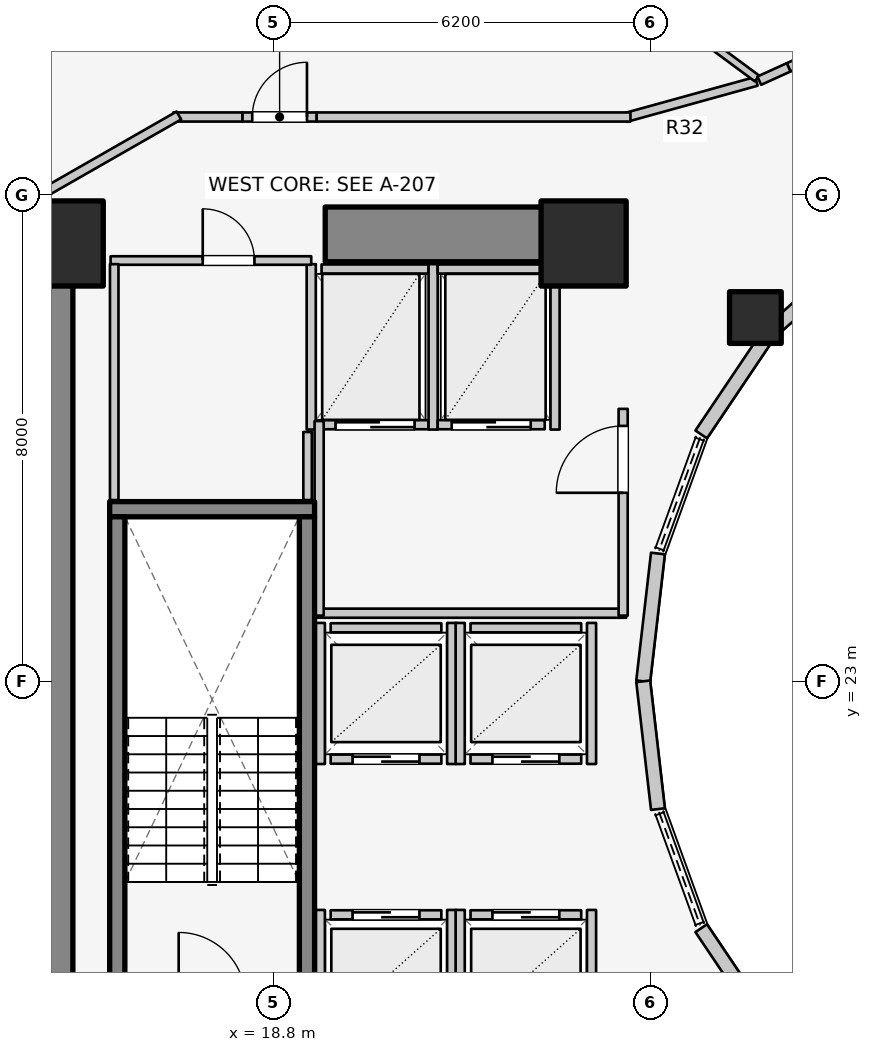
"""IFC4 building model, lengths in metres.
Left out: names, types, materials, properties, quantities, classifications, styles, units other than length and angle.
Written with IfcOpenShell. Run it as: python <this file> out.ifc"""

import sys

from ifc_helpers import new_model, si_unit, direction, frame, frame_2d, origin, origin_2d, place, context, subcontext, project, spatial, rectangle, extrude, element, fill, save


model = new_model("IFC4")
c1 = context("Model", 3, precision=1e-05, world=origin(), true_north=direction((0.0, 1.0)))
c2 = subcontext(c1, "Body", "Model", "MODEL_VIEW")
j1 = project(units=[si_unit("LENGTHUNIT", "METRE"), si_unit("PLANEANGLEUNIT", "RADIAN")], contexts=[c1])
p1 = place(None, origin())
s1 = spatial("IfcSite", under=j1, at=p1, CompositionType="ELEMENT")
p2 = place(p1, origin())
s2 = spatial("IfcBuilding", under=s1, at=p2, CompositionType="ELEMENT")
p3 = place(p2, frame((0.0, 0.0, 73.2)))
s3 = spatial("IfcBuildingStorey", under=s2, at=p3, CompositionType="ELEMENT", Elevation=73.2)
p4 = place(p3, frame((15.05, 17.05, 0.0), z_axis=(0.0, 0.0, 1.0), x_axis=(0.0, 1.0, 0.0)))
e1 = element("IfcWall", 1, at=p4, inside=s3, PredefinedType="SHEAR", context=c2, shape_type="SweptSolid", body=[
    extrude(rectangle(XDim=12.8, YDim=0.9, at=frame_2d((6.4, 0.0))), origin(), (0.0, 0.0, 1.0), 3.1),
])
p5 = place(p3, frame((19.65, 30.35, 0.0), z_axis=(0.0, 0.0, 1.0), x_axis=(1.0, 0.0, 0.0)))
e2 = element("IfcWall", 2, at=p5, inside=s3, PredefinedType="SHEAR", context=c2, shape_type="SweptSolid", body=[
    extrude(rectangle(XDim=4.5, YDim=0.9, at=frame_2d((2.25, 0.0))), origin(), (0.0, 0.0, 1.0), 3.1),
])
p6 = place(p3, frame((16.105, 25.83, 0.0), z_axis=(0.0, 0.0, 1.0), x_axis=(1.0, 0.0, 0.0)))
e3 = element("IfcWall", 3, at=p6, inside=s3, PredefinedType="SOLIDWALL", context=c2, shape_type="SweptSolid", body=[
    extrude(rectangle(XDim=3.37, YDim=0.25, at=frame_2d((1.685, 0.0))), origin(), (0.0, 0.0, 1.0), 3.1),
])
for number, where, z_axis, x_axis in (
    (4, (16.23, 17.895, 0.0), (0.0, 0.0, 1.0), (0.0, 1.0, 0.0)),
    (5, (19.35, 17.895, 0.0), (0.0, 0.0, 1.0), (0.0, 1.0, 0.0)),
):
    element("IfcWall", number, at=place(p3, frame(where, z_axis=z_axis, x_axis=x_axis)), inside=s3, PredefinedType="SOLIDWALL", context=c2, shape_type="SweptSolid", body=[
        extrude(rectangle(XDim=7.81, YDim=0.25, at=frame_2d((3.905, 0.0))), origin(), (0.0, 0.0, 1.0), 3.1),
    ])
for number, where, z_axis, x_axis in (
    (6, (23.9, 30.2, 0.0), (0.0, 0.0, 1.0), (1.0, 0.0, 0.0)),
    (7, (15.3, 30.2, 0.0), (0.0, 0.0, 1.0), (1.0, 0.0, 0.0)),
):
    element("IfcColumn", number, at=place(p3, frame(where, z_axis=z_axis, x_axis=x_axis)), inside=s3, PredefinedType="COLUMN", context=c2, shape_type="SweptSolid", body=[
        extrude(rectangle(XDim=1.4, YDim=1.4, at=origin_2d()), origin(), (0.0, 0.0, 1.0), 3.1),
    ])
p7 = place(p3, frame((26.725, 28.982, 0.0), z_axis=(0.0, 0.0, 1.0), x_axis=(1.0, 0.0, 0.0)))
e8 = element("IfcColumn", 8, at=p7, inside=s3, PredefinedType="COLUMN", context=c2, shape_type="SweptSolid", body=[
    extrude(rectangle(XDim=0.85, YDim=0.85, at=origin_2d()), origin(), (0.0, 0.0, 1.0), 3.1),
])
p8 = place(p3, frame((28.44, 30.032, 0.0), z_axis=(0.0, 0.0, 1.0), x_axis=(-0.752576694707, -0.658504607869, 0.0)))
e9 = element("IfcWall", 9, at=p8, inside=s3, PredefinedType="STANDARD", context=c2, shape_type="SweptSolid", body=[
    extrude(rectangle(XDim=1.959, YDim=0.23, at=frame_2d((0.98, 0.0))), origin(), (0.0, 0.0, 1.0), 1.22),
])
p9 = place(p3, frame((26.965, 28.742, 0.0), z_axis=(0.0, 0.0, 1.0), x_axis=(-0.558197800898, -0.829707909492, 0.0)))
e10 = element("IfcWall", 10, at=p9, inside=s3, PredefinedType="STANDARD", context=c2, shape_type="SweptSolid", body=[
    extrude(rectangle(XDim=2.027, YDim=0.23, at=frame_2d((1.013, 0.0))), origin(), (0.0, 0.0, 1.0), 1.22),
])
for number, where, z_axis, x_axis in (
    (11, (25.123, 25.102, 0.0), (0.0, 0.0, 1.0), (-0.115, -0.993, 0.0)),
    (12, (24.88, 23.0, 0.0), (0.0, 0.0, 1.0), (0.115, -0.993, 0.0)),
):
    element("IfcWall", number, at=place(p3, frame(where, z_axis=z_axis, x_axis=x_axis)), inside=s3, PredefinedType="STANDARD", context=c2, shape_type="SweptSolid", body=[
        extrude(rectangle(XDim=2.115, YDim=0.23, at=frame_2d((1.058, 0.0))), origin(), (0.0, 0.0, 1.0), 2.56),
    ])
p10 = place(p3, frame((25.834, 18.94, 0.0), z_axis=(0.0, 0.0, 1.0), x_axis=(0.558197800898, -0.829707909492, 0.0)))
e13 = element("IfcWall", 13, at=p10, inside=s3, PredefinedType="STANDARD", context=c2, shape_type="SweptSolid", body=[
    extrude(rectangle(XDim=2.027, YDim=0.23, at=frame_2d((1.013, 0.0))), origin(), (0.0, 0.0, 1.0), 1.22),
])
p11 = place(p3, frame((19.74, 19.16, 0.0), z_axis=(0.0, 0.0, 1.0), x_axis=(1.0, 0.0, 0.0)))
e14 = element("IfcWall", 14, at=p11, inside=s3, PredefinedType="SOLIDWALL", context=c2, shape_type="SweptSolid", body=[
    extrude(rectangle(XDim=1.82, YDim=0.15, at=frame_2d((0.91, 0.0))), origin(), (0.0, 0.0, 1.0), 2.575),
])
p12 = place(p11, frame((0.36, 0.0, 0.0)))
e15 = element("IfcOpeningElement", 15, at=p12, cuts=e14, PredefinedType="OPENING", context=c2, shape_type="SweptSolid", body=[
    extrude(rectangle(XDim=1.1, YDim=2.1, at=frame_2d((0.55, 1.05))), frame((0.0, 0.085, 0.0), z_axis=(0.0, -1.0, 0.0), x_axis=(1.0, 0.0, 0.0)), (0.0, 0.0, 1.0), 0.17),
])
p13 = place(p3, frame((19.57, 17.02, 0.0), z_axis=(0.0, 0.0, 1.0), x_axis=(0.0, 1.0, 0.0)))
e16 = element("IfcWall", 16, at=p13, inside=s3, PredefinedType="SOLIDWALL", context=c2, shape_type="SweptSolid", body=[
    extrude(rectangle(XDim=2.22, YDim=0.15, at=frame_2d((1.11, 0.0))), origin(), (0.0, 0.0, 1.0), 2.12),
])
p14 = place(p3, frame((21.73, 17.02, 0.0), z_axis=(0.0, 0.0, 1.0), x_axis=(0.0, 1.0, 0.0)))
e17 = element("IfcWall", 17, at=p14, inside=s3, PredefinedType="SOLIDWALL", context=c2, shape_type="SweptSolid", body=[
    extrude(rectangle(XDim=2.22, YDim=0.15, at=frame_2d((1.11, 0.0))), origin(), (0.0, 0.0, 1.0), 2.575),
])
p15 = place(p3, frame((22.04, 19.16, 0.0), z_axis=(0.0, 0.0, 1.0), x_axis=(1.0, 0.0, 0.0)))
e18 = element("IfcWall", 18, at=p15, inside=s3, PredefinedType="SOLIDWALL", context=c2, shape_type="SweptSolid", body=[
    extrude(rectangle(XDim=1.82, YDim=0.15, at=frame_2d((0.91, 0.0))), origin(), (0.0, 0.0, 1.0), 2.12),
])
p16 = place(p15, frame((0.36, 0.0, 0.0)))
e19 = element("IfcOpeningElement", 19, at=p16, cuts=e18, PredefinedType="OPENING", context=c2, shape_type="SweptSolid", body=[
    extrude(rectangle(XDim=1.1, YDim=2.1, at=frame_2d((0.55, 1.05))), frame((0.0, 0.085, 0.0), z_axis=(0.0, -1.0, 0.0), x_axis=(1.0, 0.0, 0.0)), (0.0, 0.0, 1.0), 0.17),
])
p17 = place(p3, frame((21.87, 17.02, 0.0), z_axis=(0.0, 0.0, 1.0), x_axis=(0.0, 1.0, 0.0)))
e20 = element("IfcWall", 20, at=p17, inside=s3, PredefinedType="SOLIDWALL", context=c2, shape_type="SweptSolid", body=[
    extrude(rectangle(XDim=2.22, YDim=0.15, at=frame_2d((1.11, 0.0))), origin(), (0.0, 0.0, 1.0), 2.575),
])
p18 = place(p3, frame((24.03, 17.02, 0.0), z_axis=(0.0, 0.0, 1.0), x_axis=(0.0, 1.0, 0.0)))
e21 = element("IfcWall", 21, at=p18, inside=s3, PredefinedType="SOLIDWALL", context=c2, shape_type="SweptSolid", body=[
    extrude(rectangle(XDim=2.22, YDim=0.15, at=frame_2d((1.11, 0.0))), origin(), (0.0, 0.0, 1.0), 1.873),
])
p19 = place(p3, frame((19.74, 21.72, 0.0), z_axis=(0.0, 0.0, 1.0), x_axis=(1.0, 0.0, 0.0)))
e22 = element("IfcWall", 22, at=p19, inside=s3, PredefinedType="SOLIDWALL", context=c2, shape_type="SweptSolid", body=[
    extrude(rectangle(XDim=1.82, YDim=0.15, at=frame_2d((0.91, 0.0))), origin(), (0.0, 0.0, 1.0), 2.575),
])
p20 = place(p19, frame((0.36, 0.0, 0.0)))
e23 = element("IfcOpeningElement", 23, at=p20, cuts=e22, PredefinedType="OPENING", context=c2, shape_type="SweptSolid", body=[
    extrude(rectangle(XDim=1.1, YDim=2.1, at=frame_2d((0.55, 1.05))), frame((0.0, 0.085, 0.0), z_axis=(0.0, -1.0, 0.0), x_axis=(1.0, 0.0, 0.0)), (0.0, 0.0, 1.0), 0.17),
])
p21 = place(p3, frame((19.74, 23.88, 0.0), z_axis=(0.0, 0.0, 1.0), x_axis=(1.0, 0.0, 0.0)))
e24 = element("IfcWall", 24, at=p21, inside=s3, PredefinedType="SOLIDWALL", context=c2, shape_type="SweptSolid", body=[
    extrude(rectangle(XDim=1.82, YDim=0.15, at=frame_2d((0.91, 0.0))), origin(), (0.0, 0.0, 1.0), 2.575),
])
for number, where, z_axis, x_axis in (
    (25, (19.57, 21.64, 0.0), (0.0, 0.0, 1.0), (0.0, 1.0, 0.0)),
    (26, (21.73, 21.64, 0.0), (0.0, 0.0, 1.0), (0.0, 1.0, 0.0)),
):
    element("IfcWall", number, at=place(p3, frame(where, z_axis=z_axis, x_axis=x_axis)), inside=s3, PredefinedType="SOLIDWALL", context=c2, shape_type="SweptSolid", body=[
        extrude(rectangle(XDim=2.32, YDim=0.15, at=frame_2d((1.16, 0.0))), origin(), (0.0, 0.0, 1.0), 2.575),
    ])
p22 = place(p3, frame((22.04, 21.72, 0.0), z_axis=(0.0, 0.0, 1.0), x_axis=(1.0, 0.0, 0.0)))
e27 = element("IfcWall", 27, at=p22, inside=s3, PredefinedType="SOLIDWALL", context=c2, shape_type="SweptSolid", body=[
    extrude(rectangle(XDim=1.82, YDim=0.15, at=frame_2d((0.91, 0.0))), origin(), (0.0, 0.0, 1.0), 2.12),
])
p23 = place(p22, frame((0.36, 0.0, 0.0)))
e28 = element("IfcOpeningElement", 28, at=p23, cuts=e27, PredefinedType="OPENING", context=c2, shape_type="SweptSolid", body=[
    extrude(rectangle(XDim=1.1, YDim=2.1, at=frame_2d((0.55, 1.05))), frame((0.0, 0.085, 0.0), z_axis=(0.0, -1.0, 0.0), x_axis=(1.0, 0.0, 0.0)), (0.0, 0.0, 1.0), 0.17),
])
p24 = place(p3, frame((22.04, 23.88, 0.0), z_axis=(0.0, 0.0, 1.0), x_axis=(1.0, 0.0, 0.0)))
e29 = element("IfcWall", 29, at=p24, inside=s3, PredefinedType="SOLIDWALL", context=c2, shape_type="SweptSolid", body=[
    extrude(rectangle(XDim=1.82, YDim=0.15, at=frame_2d((0.91, 0.0))), origin(), (0.0, 0.0, 1.0), 2.12),
])
p25 = place(p3, frame((21.87, 21.64, 0.0), z_axis=(0.0, 0.0, 1.0), x_axis=(0.0, 1.0, 0.0)))
e30 = element("IfcWall", 30, at=p25, inside=s3, PredefinedType="SOLIDWALL", context=c2, shape_type="SweptSolid", body=[
    extrude(rectangle(XDim=2.32, YDim=0.15, at=frame_2d((1.16, 0.0))), origin(), (0.0, 0.0, 1.0), 2.575),
])
p26 = place(p3, frame((24.03, 21.64, 0.0), z_axis=(0.0, 0.0, 1.0), x_axis=(0.0, 1.0, 0.0)))
e31 = element("IfcWall", 31, at=p26, inside=s3, PredefinedType="SOLIDWALL", context=c2, shape_type="SweptSolid", body=[
    extrude(rectangle(XDim=2.32, YDim=0.15, at=frame_2d((1.16, 0.0))), origin(), (0.0, 0.0, 1.0), 2.12),
])
p27 = place(p3, frame((19.59, 27.22, 0.0), z_axis=(0.0, 0.0, 1.0), x_axis=(1.0, 0.0, 0.0)))
e32 = element("IfcWall", 32, at=p27, inside=s3, PredefinedType="SOLIDWALL", context=c2, shape_type="SweptSolid", body=[
    extrude(rectangle(XDim=1.76, YDim=0.15, at=frame_2d((0.88, 0.0))), origin(), (0.0, 0.0, 1.0), 2.575),
])
p28 = place(p27, frame((0.23, 0.0, 0.0)))
e33 = element("IfcOpeningElement", 33, at=p28, cuts=e32, PredefinedType="OPENING", context=c2, shape_type="SweptSolid", body=[
    extrude(rectangle(XDim=1.3, YDim=2.1, at=frame_2d((0.65, 1.05))), frame((0.0, 0.085, 0.0), z_axis=(0.0, -1.0, 0.0), x_axis=(1.0, 0.0, 0.0)), (0.0, 0.0, 1.0), 0.17),
])
p29 = place(p3, frame((19.59, 29.78, 0.0), z_axis=(0.0, 0.0, 1.0), x_axis=(1.0, 0.0, 0.0)))
e34 = element("IfcWall", 34, at=p29, inside=s3, PredefinedType="SOLIDWALL", context=c2, shape_type="SweptSolid", body=[
    extrude(rectangle(XDim=1.76, YDim=0.15, at=frame_2d((0.88, 0.0))), origin(), (0.0, 0.0, 1.0), 2.575),
])
for number, where, z_axis, x_axis in (
    (35, (19.42, 27.14, 0.0), (0.0, 0.0, 1.0), (0.0, 1.0, 0.0)),
    (36, (21.425, 27.14, 0.0), (0.0, 0.0, 1.0), (0.0, 1.0, 0.0)),
):
    element("IfcWall", number, at=place(p3, frame(where, z_axis=z_axis, x_axis=x_axis)), inside=s3, PredefinedType="SOLIDWALL", context=c2, shape_type="SweptSolid", body=[
        extrude(rectangle(XDim=2.72, YDim=0.15, at=frame_2d((1.36, 0.0))), origin(), (0.0, 0.0, 1.0), 2.575),
    ])
p30 = place(p3, frame((21.5, 27.22, 0.0), z_axis=(0.0, 0.0, 1.0), x_axis=(1.0, 0.0, 0.0)))
e37 = element("IfcWall", 37, at=p30, inside=s3, PredefinedType="SOLIDWALL", context=c2, shape_type="SweptSolid", body=[
    extrude(rectangle(XDim=1.76, YDim=0.15, at=frame_2d((0.88, 0.0))), origin(), (0.0, 0.0, 1.0), 2.575),
])
p31 = place(p30, frame((0.23, 0.0, 0.0)))
e38 = element("IfcOpeningElement", 38, at=p31, cuts=e37, PredefinedType="OPENING", context=c2, shape_type="SweptSolid", body=[
    extrude(rectangle(XDim=1.3, YDim=2.1, at=frame_2d((0.65, 1.05))), frame((0.0, 0.085, 0.0), z_axis=(0.0, -1.0, 0.0), x_axis=(1.0, 0.0, 0.0)), (0.0, 0.0, 1.0), 0.17),
])
p32 = place(p3, frame((21.5, 29.78, 0.0), z_axis=(0.0, 0.0, 1.0), x_axis=(1.0, 0.0, 0.0)))
e39 = element("IfcWall", 39, at=p32, inside=s3, PredefinedType="SOLIDWALL", context=c2, shape_type="SweptSolid", body=[
    extrude(rectangle(XDim=1.76, YDim=0.15, at=frame_2d((0.88, 0.0))), origin(), (0.0, 0.0, 1.0), 2.575),
])
p33 = place(p3, frame((23.43, 27.14, 0.0), z_axis=(0.0, 0.0, 1.0), x_axis=(0.0, 1.0, 0.0)))
e40 = element("IfcWall", 40, at=p33, inside=s3, PredefinedType="SOLIDWALL", context=c2, shape_type="SweptSolid", body=[
    extrude(rectangle(XDim=2.72, YDim=0.15, at=frame_2d((1.36, 0.0))), origin(), (0.0, 0.0, 1.0), 2.575),
])
p34 = place(p3, frame((19.52, 24.12, 0.0), z_axis=(0.0, 0.0, 1.0), x_axis=(1.0, 0.0, 0.0)))
e41 = element("IfcWall", 41, at=p34, inside=s3, PredefinedType="PARTITIONING", context=c2, shape_type="SweptSolid", body=[
    extrude(rectangle(XDim=5.08, YDim=0.15, at=frame_2d((2.54, 0.0))), origin(), (0.0, 0.0, 1.0), 2.12),
])
p35 = place(p3, frame((19.55, 24.08, 0.0), z_axis=(0.0, 0.0, 1.0), x_axis=(0.0, 1.0, 0.0)))
e42 = element("IfcWall", 42, at=p35, inside=s3, PredefinedType="PARTITIONING", context=c2, shape_type="SweptSolid", body=[
    extrude(rectangle(XDim=3.2, YDim=0.15, at=frame_2d((1.6, 0.0))), origin(), (0.0, 0.0, 1.0), 2.575),
])
p36 = place(p3, frame((24.55, 24.08, 0.0), z_axis=(0.0, 0.0, 1.0), x_axis=(0.0, 1.0, 0.0)))
e43 = element("IfcWall", 43, at=p36, inside=s3, PredefinedType="PARTITIONING", context=c2, shape_type="SweptSolid", body=[
    extrude(rectangle(XDim=3.4, YDim=0.15, at=frame_2d((1.7, 0.0))), origin(), (0.0, 0.0, 1.0), 2.575),
])
p37 = place(p36, frame((2.02, 0.0, 0.0)))
e44 = element("IfcOpeningElement", 44, at=p37, cuts=e43, PredefinedType="OPENING", context=c2, shape_type="SweptSolid", body=[
    extrude(rectangle(XDim=1.1, YDim=2.1, at=frame_2d((0.55, 1.05))), frame((0.0, 0.085, 0.0), z_axis=(0.0, -1.0, 0.0), x_axis=(1.0, 0.0, 0.0)), (0.0, 0.0, 1.0), 0.17),
])
p38 = place(p3, frame((16.12, 29.92, 0.0), z_axis=(0.0, 0.0, 1.0), x_axis=(1.0, 0.0, 0.0)))
e45 = element("IfcWall", 45, at=p38, inside=s3, PredefinedType="PLUMBINGWALL", context=c2, shape_type="SweptSolid", body=[
    extrude(rectangle(XDim=3.3, YDim=0.14, at=frame_2d((1.65, 0.0))), origin(), (0.0, 0.0, 1.0), 2.575),
])
p39 = place(p38, frame((1.516, 0.0, 0.0)))
e46 = element("IfcOpeningElement", 46, at=p39, cuts=e45, PredefinedType="OPENING", context=c2, shape_type="SweptSolid", body=[
    extrude(rectangle(XDim=0.85, YDim=2.05, at=frame_2d((0.425, 1.025))), frame((0.0, 0.08, 0.0), z_axis=(0.0, -1.0, 0.0), x_axis=(1.0, 0.0, 0.0)), (0.0, 0.0, 1.0), 0.16),
])
p40 = place(p3, frame((16.18, 25.98, 0.0), z_axis=(0.0, 0.0, 1.0), x_axis=(0.0, 1.0, 0.0)))
e47 = element("IfcWall", 47, at=p40, inside=s3, PredefinedType="PLUMBINGWALL", context=c2, shape_type="SweptSolid", body=[
    extrude(rectangle(XDim=3.88, YDim=0.14, at=frame_2d((1.94, 0.0))), origin(), (0.0, 0.0, 1.0), 2.575),
])
p41 = place(p3, frame((19.36, 25.98, 0.0), z_axis=(0.0, 0.0, 1.0), x_axis=(0.0, 1.0, 0.0)))
e48 = element("IfcWall", 48, at=p41, inside=s3, PredefinedType="PLUMBINGWALL", context=c2, shape_type="SweptSolid", body=[
    extrude(rectangle(XDim=1.12, YDim=0.14, at=frame_2d((0.56, 0.0))), origin(), (0.0, 0.0, 1.0), 2.575),
])
p42 = place(p3, frame((26.742, 32.867, 0.0), z_axis=(0.0, 0.0, 1.0), x_axis=(-0.963833843713, -0.266503886865, 0.0)))
e49 = element("IfcWall", 49, at=p42, inside=s3, PredefinedType="PARTITIONING", context=c2, shape_type="SweptSolid", body=[
    extrude(rectangle(XDim=2.232, YDim=0.15, at=frame_2d((1.116, 0.0))), origin(), (0.0, 0.0, 1.0), 1.992),
])
p43 = place(p3, frame((17.15, 32.28, 0.0), z_axis=(0.0, 0.0, 1.0), x_axis=(1.0, 0.0, 0.0)))
e50 = element("IfcWall", 50, at=p43, inside=s3, PredefinedType="PARTITIONING", context=c2, shape_type="SweptSolid", body=[
    extrude(rectangle(XDim=1.14, YDim=0.15, at=frame_2d((0.57, 0.0))), origin(), (0.0, 0.0, 1.0), 2.575),
])
p44 = place(p3, frame((18.29, 32.28, 0.0), z_axis=(0.0, 0.0, 1.0), x_axis=(1.0, 0.0, 0.0)))
e51 = element("IfcWall", 51, at=p44, inside=s3, PredefinedType="PARTITIONING", context=c2, shape_type="SweptSolid", body=[
    extrude(rectangle(XDim=1.22, YDim=0.15, at=frame_2d((0.61, 0.0))), origin(), (0.0, 0.0, 1.0), 2.575),
])
p45 = place(p44, frame((0.16, 0.0, 0.0)))
e52 = element("IfcOpeningElement", 52, at=p45, cuts=e51, PredefinedType="OPENING", context=c2, shape_type="SweptSolid", body=[
    extrude(rectangle(XDim=0.9, YDim=2.1, at=frame_2d((0.45, 1.05))), frame((0.0, 0.085, 0.0), z_axis=(0.0, -1.0, 0.0), x_axis=(1.0, 0.0, 0.0)), (0.0, 0.0, 1.0), 0.17),
])
p46 = place(p3, frame((19.51, 32.28, 0.0), z_axis=(0.0, 0.0, 1.0), x_axis=(1.0, 0.0, 0.0)))
e53 = element("IfcWall", 53, at=p46, inside=s3, PredefinedType="PARTITIONING", context=c2, shape_type="SweptSolid", body=[
    extrude(rectangle(XDim=5.16, YDim=0.15, at=frame_2d((2.58, 0.0))), origin(), (0.0, 0.0, 1.0), 1.992),
])
p47 = place(p3, frame((17.243, 32.305, 0.0), z_axis=(0.0, 0.0, 1.0), x_axis=(-0.867991349648, -0.496579315857, 0.0)))
e54 = element("IfcWall", 54, at=p47, inside=s3, PredefinedType="PARTITIONING", context=c2, shape_type="SweptSolid", body=[
    extrude(rectangle(XDim=2.567, YDim=0.15, at=frame_2d((1.283, 0.0))), origin(), (0.0, 0.0, 1.0), 1.22),
])
p48 = place(p3, frame((26.751, 32.914, 0.0), z_axis=(0.0, 0.0, 1.0), x_axis=(-0.80430981394, 0.594210167533, 0.0)))
e55 = element("IfcWall", 55, at=p48, inside=s3, PredefinedType="MOVABLE", context=c2, shape_type="SweptSolid", body=[
    extrude(rectangle(XDim=9.146, YDim=0.12, at=frame_2d((4.573, 0.0))), origin(), (0.0, 0.0, 1.0), 1.22),
])
p49 = place(p3, frame((28.565, 33.684, 0.0), z_axis=(0.0, 0.0, 1.0), x_axis=(-0.910513615737, -0.413479087207, 0.0)))
e56 = element("IfcWall", 56, at=p49, inside=s3, PredefinedType="PARTITIONING", context=c2, shape_type="SweptSolid", body=[
    extrude(rectangle(XDim=1.42, YDim=0.15, at=frame_2d((0.71, 0.0))), origin(), (0.0, 0.0, 1.0), 2.16),
])
p50 = place(p49, frame((0.16, 0.0, 0.0)))
e57 = element("IfcOpeningElement", 57, at=p50, cuts=e56, PredefinedType="OPENING", context=c2, shape_type="SweptSolid", body=[
    extrude(rectangle(XDim=1.1, YDim=2.1, at=frame_2d((0.55, 1.05))), frame((0.0, 0.085, 0.0), z_axis=(0.0, -1.0, 0.0), x_axis=(1.0, 0.0, 0.0)), (0.0, 0.0, 1.0), 0.17),
])
p51 = place(p3, frame((27.272, 33.097, 0.0), z_axis=(0.0, 0.0, 1.0), x_axis=(-0.910382238922, -0.413768267336, 0.0)))
e58 = element("IfcWall", 58, at=p51, inside=s3, PredefinedType="PARTITIONING", context=c2, shape_type="SweptSolid", body=[
    extrude(rectangle(XDim=0.531, YDim=0.15, at=frame_2d((0.265, 0.0))), origin(), (0.0, 0.0, 1.0), 2.575),
])
p52 = place(p12, origin())
e59 = element("IfcDoor", 59, at=p52, inside=s3, OperationType="DOUBLE_DOOR_SLIDING", PredefinedType="DOOR", context=c2, shape_type="SweptSolid", body=[
    extrude(rectangle(XDim=1.1, YDim=2.1, at=frame_2d((0.55, 1.05))), frame((0.0, 0.025, 0.0), z_axis=(0.0, -1.0, 0.0), x_axis=(1.0, 0.0, 0.0)), (0.0, 0.0, 1.0), 0.05),
])
fill(e15, e59)
p53 = place(p16, origin())
e60 = element("IfcDoor", 60, at=p53, inside=s3, OperationType="DOUBLE_DOOR_SLIDING", PredefinedType="DOOR", context=c2, shape_type="SweptSolid", body=[
    extrude(rectangle(XDim=1.1, YDim=2.1, at=frame_2d((0.55, 1.05))), frame((0.0, 0.025, 0.0), z_axis=(0.0, -1.0, 0.0), x_axis=(1.0, 0.0, 0.0)), (0.0, 0.0, 1.0), 0.05),
])
fill(e19, e60)
p54 = place(p20, origin())
e61 = element("IfcDoor", 61, at=p54, inside=s3, OperationType="DOUBLE_DOOR_SLIDING", PredefinedType="DOOR", context=c2, shape_type="SweptSolid", body=[
    extrude(rectangle(XDim=1.1, YDim=2.1, at=frame_2d((0.55, 1.05))), frame((0.0, 0.025, 0.0), z_axis=(0.0, -1.0, 0.0), x_axis=(1.0, 0.0, 0.0)), (0.0, 0.0, 1.0), 0.05),
])
fill(e23, e61)
p55 = place(p23, origin())
e62 = element("IfcDoor", 62, at=p55, inside=s3, OperationType="DOUBLE_DOOR_SLIDING", PredefinedType="DOOR", context=c2, shape_type="SweptSolid", body=[
    extrude(rectangle(XDim=1.1, YDim=2.1, at=frame_2d((0.55, 1.05))), frame((0.0, 0.025, 0.0), z_axis=(0.0, -1.0, 0.0), x_axis=(1.0, 0.0, 0.0)), (0.0, 0.0, 1.0), 0.05),
])
fill(e28, e62)
p56 = place(p28, origin())
e63 = element("IfcDoor", 63, at=p56, inside=s3, OperationType="DOUBLE_DOOR_SLIDING", PredefinedType="DOOR", context=c2, shape_type="SweptSolid", body=[
    extrude(rectangle(XDim=1.3, YDim=2.1, at=frame_2d((0.65, 1.05))), frame((0.0, 0.025, 0.0), z_axis=(0.0, -1.0, 0.0), x_axis=(1.0, 0.0, 0.0)), (0.0, 0.0, 1.0), 0.05),
])
fill(e33, e63)
p57 = place(p31, origin())
e64 = element("IfcDoor", 64, at=p57, inside=s3, OperationType="DOUBLE_DOOR_SLIDING", PredefinedType="DOOR", context=c2, shape_type="SweptSolid", body=[
    extrude(rectangle(XDim=1.3, YDim=2.1, at=frame_2d((0.65, 1.05))), frame((0.0, 0.025, 0.0), z_axis=(0.0, -1.0, 0.0), x_axis=(1.0, 0.0, 0.0)), (0.0, 0.0, 1.0), 0.05),
])
fill(e38, e64)
p58 = place(p37, origin())
e65 = element("IfcDoor", 65, at=p58, inside=s3, OperationType="SINGLE_SWING_LEFT", PredefinedType="DOOR", context=c2, shape_type="SweptSolid", body=[
    extrude(rectangle(XDim=1.1, YDim=2.1, at=frame_2d((0.55, 1.05))), frame((0.0, 0.025, 0.0), z_axis=(0.0, -1.0, 0.0), x_axis=(1.0, 0.0, 0.0)), (0.0, 0.0, 1.0), 0.05),
])
fill(e44, e65)
p59 = place(p39, origin())
e66 = element("IfcDoor", 66, at=p59, inside=s3, OperationType="SINGLE_SWING_LEFT", PredefinedType="DOOR", context=c2, shape_type="SweptSolid", body=[
    extrude(rectangle(XDim=0.85, YDim=2.05, at=frame_2d((0.425, 1.025))), frame((0.0, 0.025, 0.0), z_axis=(0.0, -1.0, 0.0), x_axis=(1.0, 0.0, 0.0)), (0.0, 0.0, 1.0), 0.05),
])
fill(e46, e66)
p60 = place(p45, origin())
e67 = element("IfcDoor", 67, at=p60, inside=s3, OperationType="SINGLE_SWING_RIGHT", PredefinedType="DOOR", context=c2, shape_type="SweptSolid", body=[
    extrude(rectangle(XDim=0.9, YDim=2.1, at=frame_2d((0.45, 1.05))), frame((0.0, 0.025, 0.0), z_axis=(0.0, -1.0, 0.0), x_axis=(1.0, 0.0, 0.0)), (0.0, 0.0, 1.0), 0.05),
])
fill(e52, e67)
save(model, sys.argv[1])
